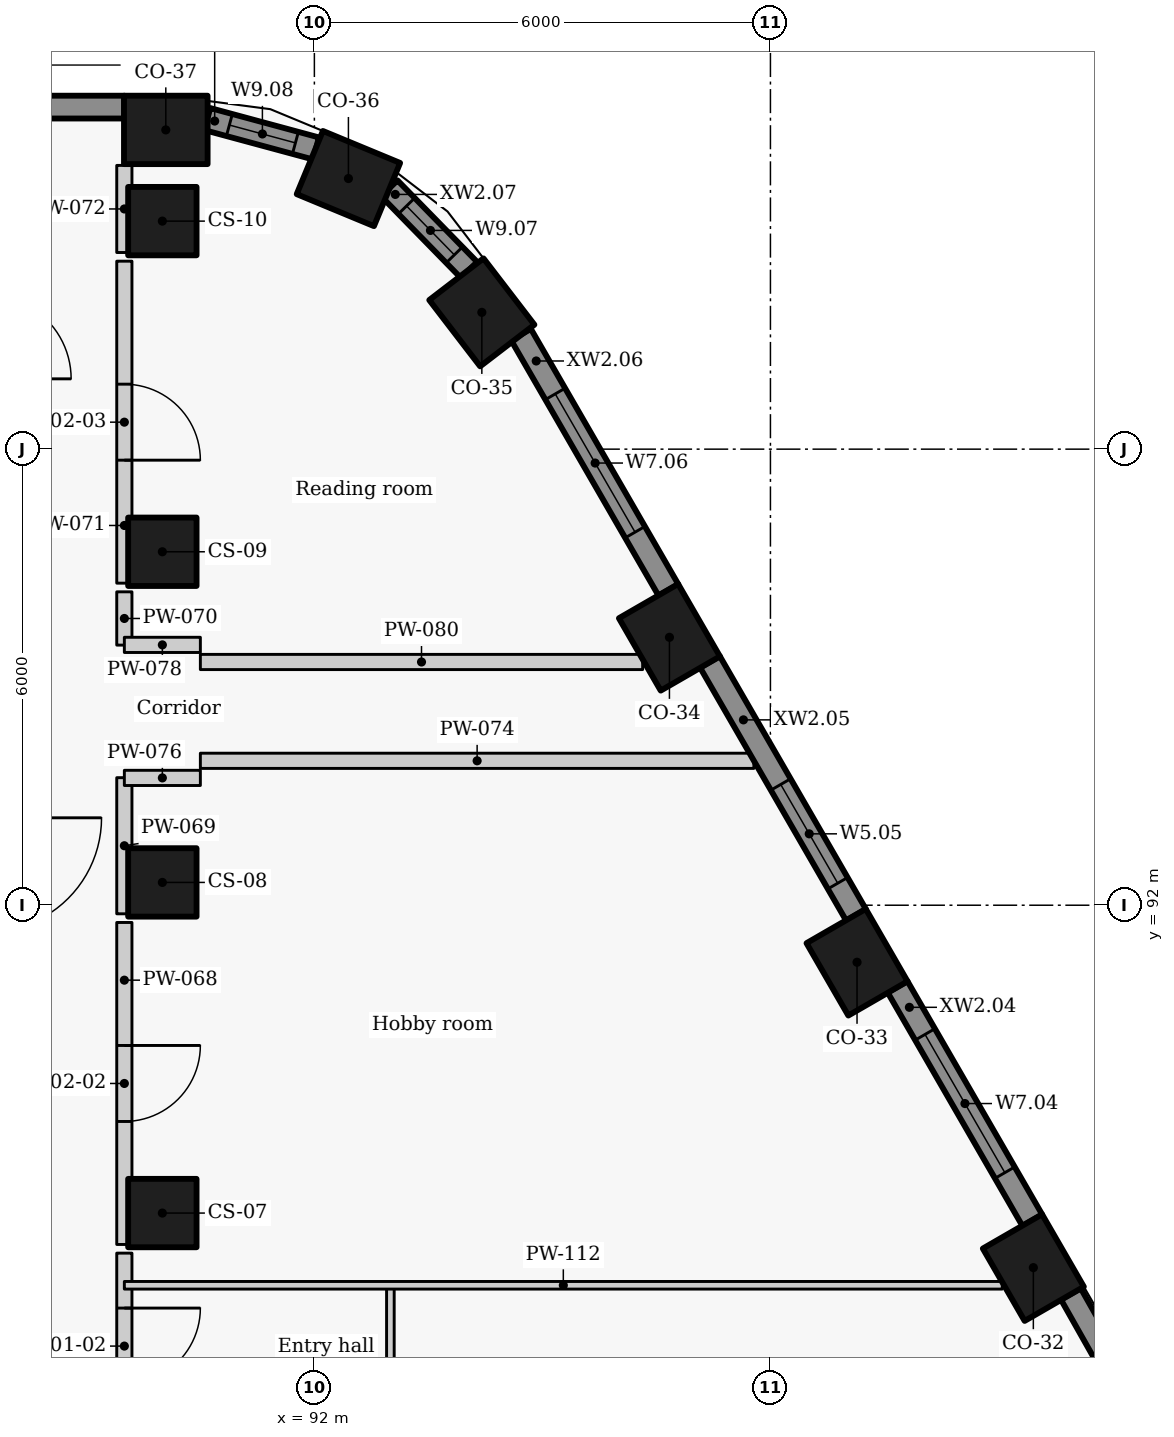
"""IFC4 building model, lengths in metres.
Left out: names, types, materials, properties, quantities, classifications, styles, units other than length and angle.
Written with IfcOpenShell. Run it as: python <this file> out.ifc"""

import sys

from ifc_helpers import new_model, si_unit, direction, frame, frame_2d, origin, origin_2d, place, context, subcontext, project, spatial, rectangle, extrude, element, fill, save


model = new_model("IFC4")
c1 = context("Model", 3, precision=1e-05, world=origin(), true_north=direction((0.0, 1.0)))
c2 = subcontext(c1, "Body", "Model", "MODEL_VIEW")
j1 = project(units=[si_unit("LENGTHUNIT", "METRE"), si_unit("PLANEANGLEUNIT", "RADIAN")], contexts=[c1])
p1 = place(None, origin())
s1 = spatial("IfcSite", under=j1, at=p1, CompositionType="ELEMENT")
p2 = place(p1, origin())
s2 = spatial("IfcBuilding", under=s1, at=p2, CompositionType="ELEMENT")
p3 = place(p2, frame((0.0, 0.0, 239.4)))
s3 = spatial("IfcBuildingStorey", under=s2, at=p3, CompositionType="ELEMENT", Elevation=239.4)
for number, where, z_axis, x_axis in (
    (1, (101.459, 87.232, 0.0), (0.0, 0.0, 1.0), (-0.5, 0.866, 0.0)),
    (2, (99.139, 91.25, 0.0), (0.0, 0.0, 1.0), (-0.5, 0.866, 0.0)),
    (3, (96.671, 95.525, 0.0), (0.0, 0.0, 1.0), (-0.5, 0.866, 0.0)),
    (4, (94.203, 99.8, 0.0), (0.0, 0.0, 1.0), (-0.609, 0.793, 0.0)),
    (5, (92.448, 101.56, 0.0), (0.0, 0.0, 1.0), (-0.924, 0.383, 0.0)),
    (6, (90.045, 102.2, 0.0), (0.0, 0.0, 1.0), (-1.0, 0.0, 0.0)),
):
    element("IfcColumn", number, at=place(p3, frame(where, z_axis=z_axis, x_axis=x_axis)), inside=s3, PredefinedType="COLUMN", context=c2, shape_type="SweptSolid", body=[
        extrude(rectangle(XDim=1.1, YDim=0.9, at=origin_2d()), origin(), (0.0, 0.0, 1.0), 3.3),
    ])
for number, where, z_axis, x_axis in (
    (7, (90.0, 87.95, 0.0), (0.0, 0.0, 1.0), (0.0, 1.0, 0.0)),
    (8, (90.0, 92.3, 0.0), (0.0, 0.0, 1.0), (0.0, 1.0, 0.0)),
    (9, (90.0, 96.65, 0.0), (0.0, 0.0, 1.0), (0.0, 1.0, 0.0)),
    (10, (90.0, 101.0, 0.0), (0.0, 0.0, 1.0), (0.0, 1.0, 0.0)),
):
    element("IfcColumn", number, at=place(p3, frame(where, z_axis=z_axis, x_axis=x_axis)), inside=s3, PredefinedType="COLUMN", context=c2, shape_type="SweptSolid", body=[
        extrude(rectangle(XDim=0.9, YDim=0.9, at=origin_2d()), origin(), (0.0, 0.0, 1.0), 3.3),
    ])
p4 = place(p3, frame((104.627, 82.154, 0.0), z_axis=(0.0, 0.0, 1.0), x_axis=(-0.492080931903, 0.870549456641, 0.0)))
e11 = element("IfcWall", 11, at=p4, inside=s3, PredefinedType="SOLIDWALL", context=c2, shape_type="SweptSolid", body=[
    extrude(rectangle(XDim=5.437, YDim=0.3, at=frame_2d((2.718, 0.0))), origin(), (0.0, 0.0, 1.0), 2.425),
])
p5 = place(p4, frame((1.931, 0.0, 0.9)))
e12 = element("IfcOpeningElement", 12, at=p5, cuts=e11, PredefinedType="OPENING", context=c2, shape_type="SweptSolid", body=[
    extrude(rectangle(XDim=2.1, YDim=1.1, at=frame_2d((1.05, 0.55))), frame((0.0, 0.16, 0.0), z_axis=(0.0, -1.0, 0.0), x_axis=(1.0, 0.0, 0.0)), (0.0, 0.0, 1.0), 0.32),
])
p6 = place(p3, frame((101.446, 87.855, 0.0), z_axis=(0.0, 0.0, 1.0), x_axis=(-0.500010404316, 0.866019396766, 0.0)))
e13 = element("IfcWall", 13, at=p6, inside=s3, PredefinedType="SOLIDWALL", context=c2, shape_type="SweptSolid", body=[
    extrude(rectangle(XDim=3.547, YDim=0.3, at=frame_2d((1.774, 0.0))), origin(), (0.0, 0.0, 1.0), 2.425),
])
p7 = place(p6, frame((0.723, 0.0, 0.9)))
e14 = element("IfcOpeningElement", 14, at=p7, cuts=e13, PredefinedType="OPENING", context=c2, shape_type="SweptSolid", body=[
    extrude(rectangle(XDim=2.1, YDim=1.1, at=frame_2d((1.05, 0.55))), frame((0.0, 0.16, 0.0), z_axis=(0.0, -1.0, 0.0), x_axis=(1.0, 0.0, 0.0)), (0.0, 0.0, 1.0), 0.32),
])
p8 = place(p3, frame((99.126, 91.873, 0.0), z_axis=(0.0, 0.0, 1.0), x_axis=(-0.499984490703, 0.866034357896, 0.0)))
e15 = element("IfcWall", 15, at=p8, inside=s3, PredefinedType="SOLIDWALL", context=c2, shape_type="SweptSolid", body=[
    extrude(rectangle(XDim=3.844, YDim=0.3, at=frame_2d((1.922, 0.0))), origin(), (0.0, 0.0, 1.0), 2.425),
])
p9 = place(p8, frame((0.482, 0.0, 0.9)))
e16 = element("IfcOpeningElement", 16, at=p9, cuts=e15, PredefinedType="OPENING", context=c2, shape_type="SweptSolid", body=[
    extrude(rectangle(XDim=1.5, YDim=1.1, at=frame_2d((0.75, 0.55))), frame((0.0, 0.16, 0.0), z_axis=(0.0, -1.0, 0.0), x_axis=(1.0, 0.0, 0.0)), (0.0, 0.0, 1.0), 0.32),
])
p10 = place(p3, frame((96.658, 96.147, 0.0), z_axis=(0.0, 0.0, 1.0), x_axis=(-0.500011218404, 0.866018926739, 0.0)))
e17 = element("IfcWall", 17, at=p10, inside=s3, PredefinedType="SOLIDWALL", context=c2, shape_type="SweptSolid", body=[
    extrude(rectangle(XDim=3.879, YDim=0.3, at=frame_2d((1.939, 0.0))), origin(), (0.0, 0.0, 1.0), 2.425),
])
p11 = place(p10, frame((0.878, 0.0, 0.9)))
e18 = element("IfcOpeningElement", 18, at=p11, cuts=e17, PredefinedType="OPENING", context=c2, shape_type="SweptSolid", body=[
    extrude(rectangle(XDim=2.1, YDim=1.1, at=frame_2d((1.05, 0.55))), frame((0.0, 0.16, 0.0), z_axis=(0.0, -1.0, 0.0), x_axis=(1.0, 0.0, 0.0)), (0.0, 0.0, 1.0), 0.32),
])
p12 = place(p3, frame((94.034, 100.358, 0.0), z_axis=(0.0, 0.0, 1.0), x_axis=(-0.698675602211, 0.71543860874, 0.0)))
e19 = element("IfcWall", 19, at=p12, inside=s3, PredefinedType="SOLIDWALL", context=c2, shape_type="SweptSolid", body=[
    extrude(rectangle(XDim=1.5, YDim=0.3, at=frame_2d((0.75, 0.0))), origin(), (0.0, 0.0, 1.0), 2.425),
])
p13 = place(p12, frame((0.276, 0.0, 0.9)))
e20 = element("IfcOpeningElement", 20, at=p13, cuts=e19, PredefinedType="OPENING", context=c2, shape_type="SweptSolid", body=[
    extrude(rectangle(XDim=0.9, YDim=1.1, at=frame_2d((0.45, 0.55))), frame((0.0, 0.16, 0.0), z_axis=(0.0, -1.0, 0.0), x_axis=(1.0, 0.0, 0.0)), (0.0, 0.0, 1.0), 0.32),
])
p14 = place(p3, frame((92.021, 101.956, 0.0), z_axis=(0.0, 0.0, 1.0), x_axis=(-0.965392564919, 0.260801065181, 0.0)))
e21 = element("IfcWall", 21, at=p14, inside=s3, PredefinedType="SOLIDWALL", context=c2, shape_type="SweptSolid", body=[
    extrude(rectangle(XDim=1.481, YDim=0.3, at=frame_2d((0.74, 0.0))), origin(), (0.0, 0.0, 1.0), 2.425),
])
p15 = place(p14, frame((0.28, 0.0, 0.9)))
e22 = element("IfcOpeningElement", 22, at=p15, cuts=e21, PredefinedType="OPENING", context=c2, shape_type="SweptSolid", body=[
    extrude(rectangle(XDim=0.9, YDim=1.1, at=frame_2d((0.45, 0.55))), frame((0.0, 0.16, 0.0), z_axis=(0.0, -1.0, 0.0), x_axis=(1.0, 0.0, 0.0)), (0.0, 0.0, 1.0), 0.32),
])
p16 = place(p3, frame((89.499, 102.5, 0.0), z_axis=(0.0, 0.0, 1.0), x_axis=(-1.0, 0.0, 0.0)))
e23 = element("IfcWall", 23, at=p16, inside=s3, PredefinedType="SOLIDWALL", context=c2, shape_type="SweptSolid", body=[
    extrude(rectangle(XDim=19.033, YDim=0.3, at=frame_2d((9.517, 0.0))), origin(), (0.0, 0.0, 1.0), 2.425),
])
p17 = place(p3, frame((89.5, 87.423, 0.0), z_axis=(0.0, 0.0, 1.0), x_axis=(0.0, -1.0, 0.0)))
e24 = element("IfcWall", 24, at=p17, inside=s3, PredefinedType="PARTITIONING", context=c2, shape_type="SweptSolid", body=[
    extrude(rectangle(XDim=5.186, YDim=0.2, at=frame_2d((2.593, 0.0))), origin(), (0.0, 0.0, 1.0), 3.025),
])
p18 = place(p17, frame((0.723, 0.0, 0.0)))
e25 = element("IfcOpeningElement", 25, at=p18, cuts=e24, PredefinedType="OPENING", context=c2, shape_type="SweptSolid", body=[
    extrude(rectangle(XDim=1.0, YDim=2.1, at=frame_2d((0.5, 1.05))), frame((0.0, 0.11, 0.0), z_axis=(0.0, -1.0, 0.0), x_axis=(1.0, 0.0, 0.0)), (0.0, 0.0, 1.0), 0.22),
])
p19 = place(p3, frame((89.5, 91.773, 0.0), z_axis=(0.0, 0.0, 1.0), x_axis=(0.0, -1.0, 0.0)))
e26 = element("IfcWall", 26, at=p19, inside=s3, PredefinedType="PARTITIONING", context=c2, shape_type="SweptSolid", body=[
    extrude(rectangle(XDim=4.236, YDim=0.2, at=frame_2d((2.118, 0.0))), origin(), (0.0, 0.0, 1.0), 3.025),
])
p20 = place(p19, frame((1.618, 0.0, 0.0)))
e27 = element("IfcOpeningElement", 27, at=p20, cuts=e26, PredefinedType="OPENING", context=c2, shape_type="SweptSolid", body=[
    extrude(rectangle(XDim=1.0, YDim=2.1, at=frame_2d((0.5, 1.05))), frame((0.0, 0.11, 0.0), z_axis=(0.0, -1.0, 0.0), x_axis=(1.0, 0.0, 0.0)), (0.0, 0.0, 1.0), 0.22),
])
p21 = place(p3, frame((89.5, 91.887, 0.0), z_axis=(0.0, 0.0, 1.0), x_axis=(0.0, 1.0, 0.0)))
e28 = element("IfcWall", 28, at=p21, inside=s3, PredefinedType="PARTITIONING", context=c2, shape_type="SweptSolid", body=[
    extrude(rectangle(XDim=1.791, YDim=0.2, at=frame_2d((0.896, 0.0))), origin(), (0.0, 0.0, 1.0), 3.025),
])
p22 = place(p3, frame((89.5, 95.422, 0.0), z_axis=(0.0, 0.0, 1.0), x_axis=(0.0, 1.0, 0.0)))
e29 = element("IfcWall", 29, at=p22, inside=s3, PredefinedType="PARTITIONING", context=c2, shape_type="SweptSolid", body=[
    extrude(rectangle(XDim=0.701, YDim=0.2, at=frame_2d((0.351, 0.0))), origin(), (0.0, 0.0, 1.0), 3.025),
])
p23 = place(p3, frame((89.5, 100.473, 0.0), z_axis=(0.0, 0.0, 1.0), x_axis=(0.0, -1.0, 0.0)))
e30 = element("IfcWall", 30, at=p23, inside=s3, PredefinedType="PARTITIONING", context=c2, shape_type="SweptSolid", body=[
    extrude(rectangle(XDim=4.236, YDim=0.2, at=frame_2d((2.118, 0.0))), origin(), (0.0, 0.0, 1.0), 3.025),
])
p24 = place(p23, frame((1.618, 0.0, 0.0)))
e31 = element("IfcOpeningElement", 31, at=p24, cuts=e30, PredefinedType="OPENING", context=c2, shape_type="SweptSolid", body=[
    extrude(rectangle(XDim=1.0, YDim=2.1, at=frame_2d((0.5, 1.05))), frame((0.0, 0.11, 0.0), z_axis=(0.0, -1.0, 0.0), x_axis=(1.0, 0.0, 0.0)), (0.0, 0.0, 1.0), 0.22),
])
p25 = place(p3, frame((89.5, 100.587, 0.0), z_axis=(0.0, 0.0, 1.0), x_axis=(0.0, 1.0, 0.0)))
e32 = element("IfcWall", 32, at=p25, inside=s3, PredefinedType="PARTITIONING", context=c2, shape_type="SweptSolid", body=[
    extrude(rectangle(XDim=1.146, YDim=0.2, at=frame_2d((0.573, 0.0))), origin(), (0.0, 0.0, 1.0), 3.025),
])
p26 = place(p3, frame((90.5, 93.9, 0.0), z_axis=(0.0, 0.0, 1.0), x_axis=(1.0, 0.0, 0.0)))
e33 = element("IfcWall", 33, at=p26, inside=s3, PredefinedType="PARTITIONING", context=c2, shape_type="SweptSolid", body=[
    extrude(rectangle(XDim=7.282, YDim=0.2, at=frame_2d((3.641, 0.0))), origin(), (0.0, 0.0, 1.0), 2.405),
])
for number, where, z_axis, x_axis in (
    (34, (89.5, 93.675, 0.0), (0.0, 0.0, 1.0), (1.0, 0.0, 0.0)),
    (35, (89.5, 95.425, 0.0), (0.0, 0.0, 1.0), (1.0, 0.0, 0.0)),
):
    element("IfcWall", number, at=place(p3, frame(where, z_axis=z_axis, x_axis=x_axis)), inside=s3, PredefinedType="PARTITIONING", context=c2, shape_type="SweptSolid", body=[
        extrude(rectangle(XDim=1.0, YDim=0.2, at=frame_2d((0.5, 0.0))), origin(), (0.0, 0.0, 1.0), 2.505),
    ])
p27 = place(p3, frame((90.5, 95.2, 0.0), z_axis=(0.0, 0.0, 1.0), x_axis=(1.0, 0.0, 0.0)))
e36 = element("IfcWall", 36, at=p27, inside=s3, PredefinedType="PARTITIONING", context=c2, shape_type="SweptSolid", body=[
    extrude(rectangle(XDim=5.819, YDim=0.2, at=frame_2d((2.909, 0.0))), origin(), (0.0, 0.0, 1.0), 3.025),
])
p28 = place(p3, frame((93.0, 87.0, 0.0), z_axis=(0.0, 0.0, 1.0), x_axis=(0.0, -1.0, 0.0)))
e37 = element("IfcWall", 37, at=p28, inside=s3, PredefinedType="PARTITIONING", context=c2, shape_type="SweptSolid", body=[
    extrude(rectangle(XDim=9.0, YDim=0.1, at=frame_2d((4.5, 0.0))), origin(), (0.0, 0.0, 1.0), 3.025),
])
p29 = place(p28, frame((4.05, 0.0, 0.0)))
e38 = element("IfcOpeningElement", 38, at=p29, cuts=e37, PredefinedType="OPENING", context=c2, shape_type="SweptSolid", body=[
    extrude(rectangle(XDim=0.9, YDim=2.1, at=frame_2d((0.45, 1.05))), frame((0.0, 0.06, 0.0), z_axis=(0.0, -1.0, 0.0), x_axis=(1.0, 0.0, 0.0)), (0.0, 0.0, 1.0), 0.12),
])
p30 = place(p3, frame((89.5, 87.0, 0.0), z_axis=(0.0, 0.0, 1.0), x_axis=(1.0, 0.0, 0.0)))
e39 = element("IfcWall", 39, at=p30, inside=s3, PredefinedType="PARTITIONING", context=c2, shape_type="SweptSolid", body=[
    extrude(rectangle(XDim=11.55, YDim=0.1, at=frame_2d((5.775, 0.0))), origin(), (0.0, 0.0, 1.0), 2.505),
])
p31 = place(p7, origin())
e40 = element("IfcWindow", 40, at=p31, inside=s3, PartitioningType="SINGLE_PANEL", PredefinedType="WINDOW", context=c2, shape_type="SweptSolid", body=[
    extrude(rectangle(XDim=2.1, YDim=1.1, at=frame_2d((1.05, 0.55))), frame((0.0, 0.03, 0.0), z_axis=(0.0, -1.0, 0.0), x_axis=(1.0, 0.0, 0.0)), (0.0, 0.0, 1.0), 0.06),
])
fill(e14, e40)
p32 = place(p9, origin())
e41 = element("IfcWindow", 41, at=p32, inside=s3, PartitioningType="SINGLE_PANEL", PredefinedType="WINDOW", context=c2, shape_type="SweptSolid", body=[
    extrude(rectangle(XDim=1.5, YDim=1.1, at=frame_2d((0.75, 0.55))), frame((0.0, 0.03, 0.0), z_axis=(0.0, -1.0, 0.0), x_axis=(1.0, 0.0, 0.0)), (0.0, 0.0, 1.0), 0.06),
])
fill(e16, e41)
p33 = place(p11, origin())
e42 = element("IfcWindow", 42, at=p33, inside=s3, PartitioningType="SINGLE_PANEL", PredefinedType="WINDOW", context=c2, shape_type="SweptSolid", body=[
    extrude(rectangle(XDim=2.1, YDim=1.1, at=frame_2d((1.05, 0.55))), frame((0.0, 0.03, 0.0), z_axis=(0.0, -1.0, 0.0), x_axis=(1.0, 0.0, 0.0)), (0.0, 0.0, 1.0), 0.06),
])
fill(e18, e42)
p34 = place(p13, origin())
e43 = element("IfcWindow", 43, at=p34, inside=s3, PartitioningType="SINGLE_PANEL", PredefinedType="WINDOW", context=c2, shape_type="SweptSolid", body=[
    extrude(rectangle(XDim=0.9, YDim=1.1, at=frame_2d((0.45, 0.55))), frame((0.0, 0.03, 0.0), z_axis=(0.0, -1.0, 0.0), x_axis=(1.0, 0.0, 0.0)), (0.0, 0.0, 1.0), 0.06),
])
fill(e20, e43)
p35 = place(p15, origin())
e44 = element("IfcWindow", 44, at=p35, inside=s3, PartitioningType="SINGLE_PANEL", PredefinedType="WINDOW", context=c2, shape_type="SweptSolid", body=[
    extrude(rectangle(XDim=0.9, YDim=1.1, at=frame_2d((0.45, 0.55))), frame((0.0, 0.03, 0.0), z_axis=(0.0, -1.0, 0.0), x_axis=(1.0, 0.0, 0.0)), (0.0, 0.0, 1.0), 0.06),
])
fill(e22, e44)
p36 = place(p18, origin())
e45 = element("IfcDoor", 45, at=p36, inside=s3, OperationType="SINGLE_SWING_LEFT", PredefinedType="DOOR", context=c2, shape_type="SweptSolid", body=[
    extrude(rectangle(XDim=1.0, YDim=2.1, at=frame_2d((0.5, 1.05))), frame((0.0, 0.025, 0.0), z_axis=(0.0, -1.0, 0.0), x_axis=(1.0, 0.0, 0.0)), (0.0, 0.0, 1.0), 0.05),
])
fill(e25, e45)
p37 = place(p20, origin())
e46 = element("IfcDoor", 46, at=p37, inside=s3, OperationType="SINGLE_SWING_LEFT", PredefinedType="DOOR", context=c2, shape_type="SweptSolid", body=[
    extrude(rectangle(XDim=1.0, YDim=2.1, at=frame_2d((0.5, 1.05))), frame((0.0, 0.025, 0.0), z_axis=(0.0, -1.0, 0.0), x_axis=(1.0, 0.0, 0.0)), (0.0, 0.0, 1.0), 0.05),
])
fill(e27, e46)
p38 = place(p24, origin())
e47 = element("IfcDoor", 47, at=p38, inside=s3, OperationType="SINGLE_SWING_RIGHT", PredefinedType="DOOR", context=c2, shape_type="SweptSolid", body=[
    extrude(rectangle(XDim=1.0, YDim=2.1, at=frame_2d((0.5, 1.05))), frame((0.0, 0.025, 0.0), z_axis=(0.0, -1.0, 0.0), x_axis=(1.0, 0.0, 0.0)), (0.0, 0.0, 1.0), 0.05),
])
fill(e31, e47)
save(model, sys.argv[1])
